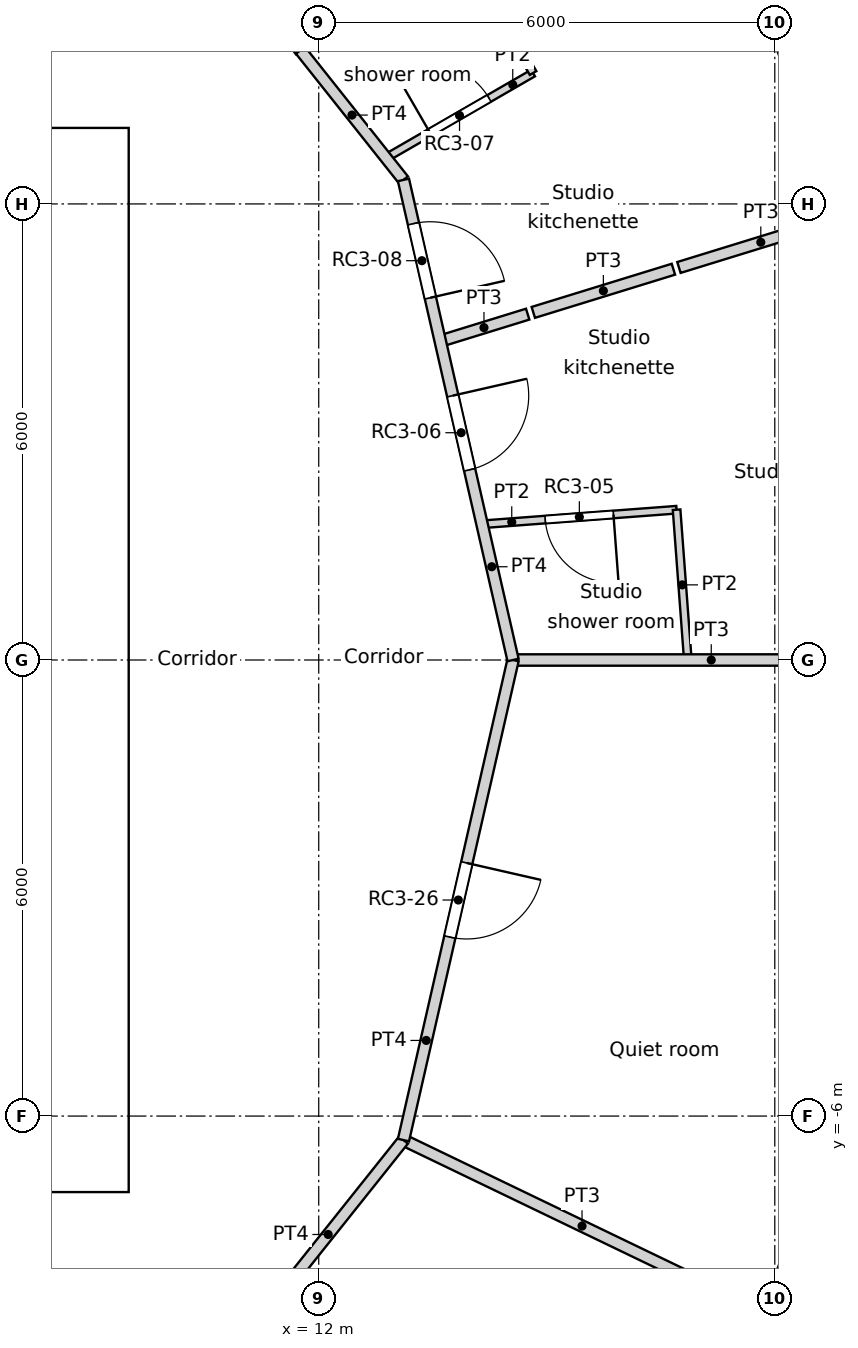
"""IFC4 building model, lengths in metres.
Left out: names, types, materials, properties, quantities, classifications, styles, units other than length and angle.
Written with IfcOpenShell. Run it as: python <this file> out.ifc"""

import sys

from ifc_helpers import new_model, si_unit, direction, frame, frame_2d, origin, origin_2d, place, context, subcontext, project, spatial, rectangle, circle, extrude, element, fill, save


model = new_model("IFC4")
c1 = context("Model", 3, precision=1e-05, world=origin(), true_north=direction((0.0, 1.0)))
c2 = subcontext(c1, "Body", "Model", "MODEL_VIEW")
j1 = project(units=[si_unit("LENGTHUNIT", "METRE"), si_unit("PLANEANGLEUNIT", "RADIAN")], contexts=[c1])
p1 = place(None, origin())
s1 = spatial("IfcSite", under=j1, at=p1, CompositionType="ELEMENT")
p2 = place(p1, origin())
s2 = spatial("IfcBuilding", under=s1, at=p2, CompositionType="ELEMENT")
p3 = place(p2, frame((0.0, 0.0, 252.6)))
s3 = spatial("IfcBuildingStorey", under=s2, at=p3, CompositionType="ELEMENT", Elevation=252.6)
for number, where, z_axis, x_axis in (
    (1, (17.986, 5.548, 0.0), (0.0, 0.0, 1.0), (1.0, 0.0, 0.0)),
    (2, (17.986, -5.548, 0.0), (0.0, 0.0, 1.0), (1.0, 0.0, 0.0)),
):
    element("IfcColumn", number, at=place(p3, frame(where, z_axis=z_axis, x_axis=x_axis)), inside=s3, PredefinedType="COLUMN", context=c2, shape_type="SweptSolid", body=[
        extrude(circle(Radius=0.55, at=origin_2d()), origin(), (0.0, 0.0, 1.0), 3.6),
    ])
p4 = place(p3, frame((19.037, 5.872, 0.0), z_axis=(0.0, 0.0, 1.0), x_axis=(-0.36530043032, 0.930889679612, 0.0)))
e3 = element("IfcWall", 3, at=p4, inside=s3, PredefinedType="SOLIDWALL", context=c2, shape_type="SweptSolid", body=[
    extrude(rectangle(XDim=2.962, YDim=0.3, at=frame_2d((1.481, 0.0))), origin(), (0.0, 0.0, 1.0), 3.25),
])
p5 = place(p4, frame((1.481, 0.0, 1.55)))
e4 = element("IfcOpeningElement", 4, at=p5, cuts=e3, PredefinedType="OPENING", context=c2, shape_type="SweptSolid", body=[
    extrude(circle(Radius=0.9, at=origin_2d()), frame((0.0, 0.16, 0.0), z_axis=(0.0, -1.0, 0.0), x_axis=(1.0, 0.0, 0.0)), (0.0, 0.0, 1.0), 0.32),
])
p6 = place(p3, frame((18.48, -8.864, -0.35), z_axis=(0.0, 0.0, 1.0), x_axis=(0.36537792632, 0.93085926485, 0.0)))
e5 = element("IfcWall", 5, at=p6, inside=s3, PredefinedType="ELEMENTEDWALL", context=c2, shape_type="SweptSolid", body=[
    extrude(rectangle(XDim=3.0, YDim=1.45, at=frame_2d((1.5, 0.0))), origin(), (0.0, 0.0, 1.0), 3.6),
])
p7 = place(p6, frame((1.5, 0.0, 1.9)))
e6 = element("IfcOpeningElement", 6, at=p7, cuts=e5, PredefinedType="OPENING", context=c2, shape_type="SweptSolid", body=[
    extrude(circle(Radius=0.9, at=origin_2d()), frame((0.0, 0.735, 0.0), z_axis=(0.0, -1.0, 0.0), x_axis=(1.0, 0.0, 0.0)), (0.0, 0.0, 1.0), 1.47),
])
p8 = place(p3, frame((-9.5, -6.7, 0.0), z_axis=(0.0, 0.0, 1.0), x_axis=(1.0, 0.0, 0.0)))
e7 = element("IfcWall", 7, at=p8, inside=s3, PredefinedType="SOLIDWALL", context=c2, shape_type="SweptSolid", body=[
    extrude(rectangle(XDim=19.0, YDim=0.6, at=frame_2d((9.5, 0.0))), origin(), (0.0, 0.0, 1.0), 3.6),
])
p9 = place(p8, frame((10.4, 0.0, 0.0)))
e8 = element("IfcOpeningElement", 8, at=p9, cuts=e7, PredefinedType="OPENING", context=c2, shape_type="SweptSolid", body=[
    extrude(rectangle(XDim=1.0, YDim=2.1, at=frame_2d((0.5, 1.05))), frame((0.0, 0.3, 0.0), z_axis=(0.0, -1.0, 0.0), x_axis=(1.0, 0.0, 0.0)), (0.0, 0.0, 1.0), 0.6),
])
p10 = place(p8, frame((5.35, 0.0, 0.0)))
e9 = element("IfcOpeningElement", 9, at=p10, cuts=e7, PredefinedType="OPENING", context=c2, shape_type="SweptSolid", body=[
    extrude(rectangle(XDim=1.7, YDim=2.1, at=frame_2d((0.85, 1.05))), frame((0.0, 0.3, 0.0), z_axis=(0.0, -1.0, 0.0), x_axis=(1.0, 0.0, 0.0)), (0.0, 0.0, 1.0), 0.6),
])
p11 = place(p8, frame((11.95, 0.0, 0.0)))
e10 = element("IfcOpeningElement", 10, at=p11, cuts=e7, PredefinedType="OPENING", context=c2, shape_type="SweptSolid", body=[
    extrude(rectangle(XDim=1.7, YDim=2.1, at=frame_2d((0.85, 1.05))), frame((0.0, 0.3, 0.0), z_axis=(0.0, -1.0, 0.0), x_axis=(1.0, 0.0, 0.0)), (0.0, 0.0, 1.0), 0.6),
])
p12 = place(p3, frame((-9.5, 6.7, 0.0), z_axis=(0.0, 0.0, 1.0), x_axis=(1.0, 0.0, 0.0)))
e11 = element("IfcWall", 11, at=p12, inside=s3, PredefinedType="SOLIDWALL", context=c2, shape_type="SweptSolid", body=[
    extrude(rectangle(XDim=19.0, YDim=0.6, at=frame_2d((9.5, 0.0))), origin(), (0.0, 0.0, 1.0), 3.6),
])
p13 = place(p12, frame((5.35, 0.0, 0.0)))
e12 = element("IfcOpeningElement", 12, at=p13, cuts=e11, PredefinedType="OPENING", context=c2, shape_type="SweptSolid", body=[
    extrude(rectangle(XDim=1.7, YDim=2.1, at=frame_2d((0.85, 1.05))), frame((0.0, 0.3, 0.0), z_axis=(0.0, -1.0, 0.0), x_axis=(1.0, 0.0, 0.0)), (0.0, 0.0, 1.0), 0.6),
])
p14 = place(p3, frame((9.2, -6.4, 0.0), z_axis=(0.0, 0.0, 1.0), x_axis=(0.0, 1.0, 0.0)))
e13 = element("IfcWall", 13, at=p14, inside=s3, PredefinedType="SOLIDWALL", context=c2, shape_type="SweptSolid", body=[
    extrude(rectangle(XDim=12.8, YDim=0.6, at=frame_2d((6.4, 0.0))), origin(), (0.0, 0.0, 1.0), 3.6),
])
p15 = place(p14, frame((6.4, 0.0, 0.0)))
e14 = element("IfcOpeningElement", 14, at=p15, cuts=e13, PredefinedType="OPENING", context=c2, shape_type="SweptSolid", body=[
    extrude(rectangle(XDim=1.8, YDim=2.1, at=frame_2d((0.9, 1.05))), frame((0.0, 0.3, 0.0), z_axis=(0.0, -1.0, 0.0), x_axis=(1.0, 0.0, 0.0)), (0.0, 0.0, 1.0), 0.6),
])
p16 = place(p3, frame((2.1, -3.1, 0.0), z_axis=(0.0, 0.0, 1.0), x_axis=(1.0, 0.0, 0.0)))
e15 = element("IfcWall", 15, at=p16, inside=s3, PredefinedType="SOLIDWALL", context=c2, shape_type="SweptSolid", body=[
    extrude(rectangle(XDim=6.8, YDim=0.3, at=frame_2d((3.4, 0.0))), origin(), (0.0, 0.0, 1.0), 3.25),
])
p17 = place(p16, frame((0.35, 0.0, 0.0)))
e16 = element("IfcOpeningElement", 16, at=p17, cuts=e15, PredefinedType="OPENING", context=c2, shape_type="SweptSolid", body=[
    extrude(rectangle(XDim=1.7, YDim=2.1, at=frame_2d((0.85, 1.05))), frame((0.0, 0.15, 0.0), z_axis=(0.0, -1.0, 0.0), x_axis=(1.0, 0.0, 0.0)), (0.0, 0.0, 1.0), 0.3),
])
p18 = place(p3, frame((-4.35, 3.1, 0.0), z_axis=(0.0, 0.0, 1.0), x_axis=(1.0, 0.0, 0.0)))
e17 = element("IfcWall", 17, at=p18, inside=s3, PredefinedType="SOLIDWALL", context=c2, shape_type="SweptSolid", body=[
    extrude(rectangle(XDim=13.25, YDim=0.3, at=frame_2d((6.625, 0.0))), origin(), (0.0, 0.0, 1.0), 3.25),
])
p19 = place(p18, frame((2.95, 0.0, 0.0)))
e18 = element("IfcOpeningElement", 18, at=p19, cuts=e17, PredefinedType="OPENING", context=c2, shape_type="SweptSolid", body=[
    extrude(rectangle(XDim=1.1, YDim=2.1, at=frame_2d((0.55, 1.05))), frame((0.0, 0.15, 0.0), z_axis=(0.0, -1.0, 0.0), x_axis=(1.0, 0.0, 0.0)), (0.0, 0.0, 1.0), 0.3),
])
p20 = place(p18, frame((5.75, 0.0, 0.0)))
e19 = element("IfcOpeningElement", 19, at=p20, cuts=e17, PredefinedType="OPENING", context=c2, shape_type="SweptSolid", body=[
    extrude(rectangle(XDim=1.1, YDim=2.1, at=frame_2d((0.55, 1.05))), frame((0.0, 0.15, 0.0), z_axis=(0.0, -1.0, 0.0), x_axis=(1.0, 0.0, 0.0)), (0.0, 0.0, 1.0), 0.3),
])
p21 = place(p18, frame((8.55, 0.0, 0.0)))
e20 = element("IfcOpeningElement", 20, at=p21, cuts=e17, PredefinedType="OPENING", context=c2, shape_type="SweptSolid", body=[
    extrude(rectangle(XDim=1.1, YDim=2.1, at=frame_2d((0.55, 1.05))), frame((0.0, 0.15, 0.0), z_axis=(0.0, -1.0, 0.0), x_axis=(1.0, 0.0, 0.0)), (0.0, 0.0, 1.0), 0.3),
])
p22 = place(p3, frame((4.225, -0.425, 0.0), z_axis=(0.0, 0.0, 1.0), x_axis=(1.0, 0.0, 0.0)))
e21 = element("IfcWall", 21, at=p22, inside=s3, PredefinedType="SOLIDWALL", context=c2, shape_type="SweptSolid", body=[
    extrude(rectangle(XDim=4.675, YDim=0.15, at=frame_2d((2.337, 0.0))), origin(), (0.0, 0.0, 1.0), 3.25),
])
p23 = place(p22, frame((0.312, 0.0, 0.0)))
e22 = element("IfcOpeningElement", 22, at=p23, cuts=e21, PredefinedType="OPENING", context=c2, shape_type="SweptSolid", body=[
    extrude(rectangle(XDim=0.9, YDim=2.1, at=frame_2d((0.45, 1.05))), frame((0.0, 0.075, 0.0), z_axis=(0.0, -1.0, 0.0), x_axis=(1.0, 0.0, 0.0)), (0.0, 0.0, 1.0), 0.15),
])
p24 = place(p22, frame((1.7, 0.0, 0.0)))
e23 = element("IfcOpeningElement", 23, at=p24, cuts=e21, PredefinedType="OPENING", context=c2, shape_type="SweptSolid", body=[
    extrude(rectangle(XDim=0.9, YDim=2.1, at=frame_2d((0.45, 1.05))), frame((0.0, 0.075, 0.0), z_axis=(0.0, -1.0, 0.0), x_axis=(1.0, 0.0, 0.0)), (0.0, 0.0, 1.0), 0.15),
])
p25 = place(p22, frame((3.35, 0.0, 0.0)))
e24 = element("IfcOpeningElement", 24, at=p25, cuts=e21, PredefinedType="OPENING", context=c2, shape_type="SweptSolid", body=[
    extrude(rectangle(XDim=0.9, YDim=2.1, at=frame_2d((0.45, 1.05))), frame((0.0, 0.075, 0.0), z_axis=(0.0, -1.0, 0.0), x_axis=(1.0, 0.0, 0.0)), (0.0, 0.0, 1.0), 0.15),
])
p26 = place(p3, frame((13.115, 6.316, 0.0), z_axis=(0.0, 0.0, 1.0), x_axis=(0.222568978642, -0.97491694505, 0.0)))
e25 = element("IfcWall", 25, at=p26, inside=s3, PredefinedType="PARTITIONING", context=c2, shape_type="SweptSolid", body=[
    extrude(rectangle(XDim=6.479, YDim=0.15, at=frame_2d((3.239, 0.0))), origin(), (0.0, 0.0, 1.0), 3.25),
])
p27 = place(p26, frame((2.911, 0.0, 0.0)))
e26 = element("IfcOpeningElement", 26, at=p27, cuts=e25, PredefinedType="OPENING", context=c2, shape_type="SweptSolid", body=[
    extrude(rectangle(XDim=1.0, YDim=2.1, at=frame_2d((0.5, 1.05))), frame((0.0, 0.075, 0.0), z_axis=(0.0, -1.0, 0.0), x_axis=(1.0, 0.0, 0.0)), (0.0, 0.0, 1.0), 0.15),
])
p28 = place(p26, frame((0.59, 0.0, 0.0)))
e27 = element("IfcOpeningElement", 27, at=p28, cuts=e25, PredefinedType="OPENING", context=c2, shape_type="SweptSolid", body=[
    extrude(rectangle(XDim=1.0, YDim=2.1, at=frame_2d((0.5, 1.05))), frame((0.0, 0.075, 0.0), z_axis=(0.0, -1.0, 0.0), x_axis=(1.0, 0.0, 0.0)), (0.0, 0.0, 1.0), 0.15),
])
p29 = place(p3, frame((11.76, 8.022, 0.0), z_axis=(0.0, 0.0, 1.0), x_axis=(0.62206805366, -0.782963177049, 0.0)))
e28 = element("IfcWall", 28, at=p29, inside=s3, PredefinedType="PARTITIONING", context=c2, shape_type="SweptSolid", body=[
    extrude(rectangle(XDim=2.179, YDim=0.15, at=frame_2d((1.089, 0.0))), origin(), (0.0, 0.0, 1.0), 3.25),
])
p30 = place(p3, frame((11.3, 8.592, 0.0), z_axis=(0.0, 0.0, 1.0), x_axis=(0.623405636383, -0.781898594785, 0.0)))
e29 = element("IfcWall", 29, at=p30, inside=s3, PredefinedType="PARTITIONING", context=c2, shape_type="SweptSolid", body=[
    extrude(rectangle(XDim=0.74, YDim=0.15, at=frame_2d((0.37, 0.0))), origin(), (0.0, 0.0, 1.0), 3.25),
])
p31 = place(p3, frame((11.134, -8.8, 0.0), z_axis=(0.0, 0.0, 1.0), x_axis=(0.623476099415, 0.781842409606, 0.0)))
e30 = element("IfcWall", 30, at=p31, inside=s3, PredefinedType="PARTITIONING", context=c2, shape_type="SweptSolid", body=[
    extrude(rectangle(XDim=3.177, YDim=0.15, at=frame_2d((1.589, 0.0))), origin(), (0.0, 0.0, 1.0), 3.25),
])
p32 = place(p3, frame((13.115, -6.316, 0.0), z_axis=(0.0, 0.0, 1.0), x_axis=(0.222568978642, 0.97491694505, 0.0)))
e31 = element("IfcWall", 31, at=p32, inside=s3, PredefinedType="PARTITIONING", context=c2, shape_type="SweptSolid", body=[
    extrude(rectangle(XDim=6.479, YDim=0.15, at=frame_2d((3.239, 0.0))), origin(), (0.0, 0.0, 1.0), 3.25),
])
p33 = place(p32, frame((2.74, 0.0, 0.0)))
e32 = element("IfcOpeningElement", 32, at=p33, cuts=e31, PredefinedType="OPENING", context=c2, shape_type="SweptSolid", body=[
    extrude(rectangle(XDim=1.0, YDim=2.04, at=frame_2d((0.5, 1.02))), frame((0.0, 0.075, 0.0), z_axis=(0.0, -1.0, 0.0), x_axis=(1.0, 0.0, 0.0)), (0.0, 0.0, 1.0), 0.15),
])
p34 = place(p3, frame((16.708, 1.977, 0.0), z_axis=(0.0, 0.0, 1.0), x_axis=(0.074624634103, -0.997211694669, 0.0)))
e33 = element("IfcWall", 33, at=p34, inside=s3, PredefinedType="PARTITIONING", context=c2, shape_type="SweptSolid", body=[
    extrude(rectangle(XDim=1.983, YDim=0.1, at=frame_2d((0.991, 0.0))), origin(), (0.0, 0.0, 1.0), 3.25),
])
p35 = place(p3, frame((14.149, 1.785, 0.0), z_axis=(0.0, 0.0, 1.0), x_axis=(0.997193275785, 0.074870359477, 0.0)))
e34 = element("IfcWall", 34, at=p35, inside=s3, PredefinedType="PARTITIONING", context=c2, shape_type="SweptSolid", body=[
    extrude(rectangle(XDim=2.566, YDim=0.1, at=frame_2d((1.283, 0.0))), origin(), (0.0, 0.0, 1.0), 3.25),
])
p36 = place(p35, frame((0.833, 0.0, 0.0)))
e35 = element("IfcOpeningElement", 35, at=p36, cuts=e34, PredefinedType="OPENING", context=c2, shape_type="SweptSolid", body=[
    extrude(rectangle(XDim=0.9, YDim=2.04, at=frame_2d((0.45, 1.02))), frame((0.0, 0.05, 0.0), z_axis=(0.0, -1.0, 0.0), x_axis=(1.0, 0.0, 0.0)), (0.0, 0.0, 1.0), 0.1),
])
p37 = place(p3, frame((13.599, 4.195, 0.0), z_axis=(0.0, 0.0, 1.0), x_axis=(0.955506647746, 0.294969568115, 0.0)))
e36 = element("IfcWall", 36, at=p37, inside=s3, PredefinedType="PARTITIONING", context=c2, shape_type="SweptSolid", body=[
    extrude(rectangle(XDim=1.203, YDim=0.15, at=frame_2d((0.602, 0.0))), origin(), (0.0, 0.0, 1.0), 3.25),
])
p38 = place(p3, frame((16.739, 5.164, 0.0), z_axis=(0.0, 0.0, 1.0), x_axis=(0.955650111791, 0.294504437715, 0.0)))
e37 = element("IfcWall", 37, at=p38, inside=s3, PredefinedType="PARTITIONING", context=c2, shape_type="SweptSolid", body=[
    extrude(rectangle(XDim=2.254, YDim=0.15, at=frame_2d((1.127, 0.0))), origin(), (0.0, 0.0, 1.0), 3.25),
])
p39 = place(p3, frame((14.557, 0.0, 0.0), z_axis=(0.0, 0.0, 1.0), x_axis=(1.0, 0.0, 0.0)))
e38 = element("IfcWall", 38, at=p39, inside=s3, PredefinedType="PARTITIONING", context=c2, shape_type="SweptSolid", body=[
    extrude(rectangle(XDim=5.214, YDim=0.15, at=frame_2d((2.607, 0.0))), origin(), (0.0, 0.0, 1.0), 3.25),
])
p40 = place(p3, frame((14.823, 4.573, 0.0), z_axis=(0.0, 0.0, 1.0), x_axis=(0.955628343972, 0.294575063773, 0.0)))
e39 = element("IfcWall", 39, at=p40, inside=s3, PredefinedType="PARTITIONING", context=c2, shape_type="SweptSolid", body=[
    extrude(rectangle(XDim=1.929, YDim=0.15, at=frame_2d((0.964, 0.0))), origin(), (0.0, 0.0, 1.0), 3.25),
])
p41 = place(p3, frame((12.885, 6.605, 0.0), z_axis=(0.0, 0.0, 1.0), x_axis=(0.866076416361, 0.499911633214, 0.0)))
e40 = element("IfcWall", 40, at=p41, inside=s3, PredefinedType="PARTITIONING", context=c2, shape_type="SweptSolid", body=[
    extrude(rectangle(XDim=2.234, YDim=0.1, at=frame_2d((1.117, 0.0))), origin(), (0.0, 0.0, 1.0), 3.25),
])
p42 = place(p41, frame((0.667, 0.0, 0.0)))
e41 = element("IfcOpeningElement", 41, at=p42, cuts=e40, PredefinedType="OPENING", context=c2, shape_type="SweptSolid", body=[
    extrude(rectangle(XDim=0.9, YDim=2.04, at=frame_2d((0.45, 1.02))), frame((0.0, 0.05, 0.0), z_axis=(0.0, -1.0, 0.0), x_axis=(1.0, 0.0, 0.0)), (0.0, 0.0, 1.0), 0.1),
])
p43 = place(p3, frame((13.833, 9.431, 0.0), z_axis=(0.0, 0.0, 1.0), x_axis=(0.500143626598, -0.865942465048, 0.0)))
e42 = element("IfcWall", 42, at=p43, inside=s3, PredefinedType="PARTITIONING", context=c2, shape_type="SweptSolid", body=[
    extrude(rectangle(XDim=1.974, YDim=0.1, at=frame_2d((0.987, 0.0))), origin(), (0.0, 0.0, 1.0), 3.25),
])
p44 = place(p3, frame((11.759, 8.017, 0.0), z_axis=(0.0, 0.0, 1.0), x_axis=(0.826143746222, 0.563459413426, 0.0)))
e43 = element("IfcWall", 43, at=p44, inside=s3, PredefinedType="PARTITIONING", context=c2, shape_type="SweptSolid", body=[
    extrude(rectangle(XDim=2.41, YDim=0.15, at=frame_2d((1.205, 0.0))), origin(), (0.0, 0.0, 1.0), 3.25),
])
p45 = place(p3, frame((13.115, -6.316, 0.0), z_axis=(0.0, 0.0, 1.0), x_axis=(0.901004381064, -0.433809987557, 0.0)))
e44 = element("IfcWall", 44, at=p45, inside=s3, PredefinedType="PARTITIONING", context=c2, shape_type="SweptSolid", body=[
    extrude(rectangle(XDim=5.214, YDim=0.15, at=frame_2d((2.607, 0.0))), origin(), (0.0, 0.0, 1.0), 3.25),
])
p46 = place(p15, origin())
e45 = element("IfcDoor", 45, at=p46, inside=s3, OperationType="DOUBLE_DOOR_SINGLE_SWING", PredefinedType="DOOR", context=c2, shape_type="SweptSolid", body=[
    extrude(rectangle(XDim=1.8, YDim=2.1, at=frame_2d((0.9, 1.05))), frame((0.0, 0.025, 0.0), z_axis=(0.0, -1.0, 0.0), x_axis=(1.0, 0.0, 0.0)), (0.0, 0.0, 1.0), 0.05),
])
fill(e14, e45)
p47 = place(p36, origin())
e46 = element("IfcDoor", 46, at=p47, inside=s3, OperationType="SINGLE_SWING_LEFT", PredefinedType="DOOR", context=c2, shape_type="SweptSolid", body=[
    extrude(rectangle(XDim=0.9, YDim=2.04, at=frame_2d((0.45, 1.02))), frame((0.0, 0.025, 0.0), z_axis=(0.0, -1.0, 0.0), x_axis=(1.0, 0.0, 0.0)), (0.0, 0.0, 1.0), 0.05),
])
fill(e35, e46)
p48 = place(p27, origin())
e47 = element("IfcDoor", 47, at=p48, inside=s3, OperationType="SINGLE_SWING_LEFT", PredefinedType="DOOR", context=c2, shape_type="SweptSolid", body=[
    extrude(rectangle(XDim=1.0, YDim=2.1, at=frame_2d((0.5, 1.05))), frame((0.0, 0.025, 0.0), z_axis=(0.0, -1.0, 0.0), x_axis=(1.0, 0.0, 0.0)), (0.0, 0.0, 1.0), 0.05),
])
fill(e26, e47)
p49 = place(p42, origin())
e48 = element("IfcDoor", 48, at=p49, inside=s3, OperationType="SINGLE_SWING_LEFT", PredefinedType="DOOR", context=c2, shape_type="SweptSolid", body=[
    extrude(rectangle(XDim=0.9, YDim=2.04, at=frame_2d((0.45, 1.02))), frame((0.0, 0.025, 0.0), z_axis=(0.0, -1.0, 0.0), x_axis=(1.0, 0.0, 0.0)), (0.0, 0.0, 1.0), 0.05),
])
fill(e41, e48)
p50 = place(p28, origin())
e49 = element("IfcDoor", 49, at=p50, inside=s3, OperationType="SINGLE_SWING_RIGHT", PredefinedType="DOOR", context=c2, shape_type="SweptSolid", body=[
    extrude(rectangle(XDim=1.0, YDim=2.1, at=frame_2d((0.5, 1.05))), frame((0.0, 0.025, 0.0), z_axis=(0.0, -1.0, 0.0), x_axis=(1.0, 0.0, 0.0)), (0.0, 0.0, 1.0), 0.05),
])
fill(e27, e49)
p51 = place(p33, origin())
e50 = element("IfcDoor", 50, at=p51, inside=s3, OperationType="SINGLE_SWING_LEFT", PredefinedType="DOOR", context=c2, shape_type="SweptSolid", body=[
    extrude(rectangle(XDim=1.0, YDim=2.04, at=frame_2d((0.5, 1.02))), frame((0.0, 0.025, 0.0), z_axis=(0.0, -1.0, 0.0), x_axis=(1.0, 0.0, 0.0)), (0.0, 0.0, 1.0), 0.05),
])
fill(e32, e50)
save(model, sys.argv[1])
